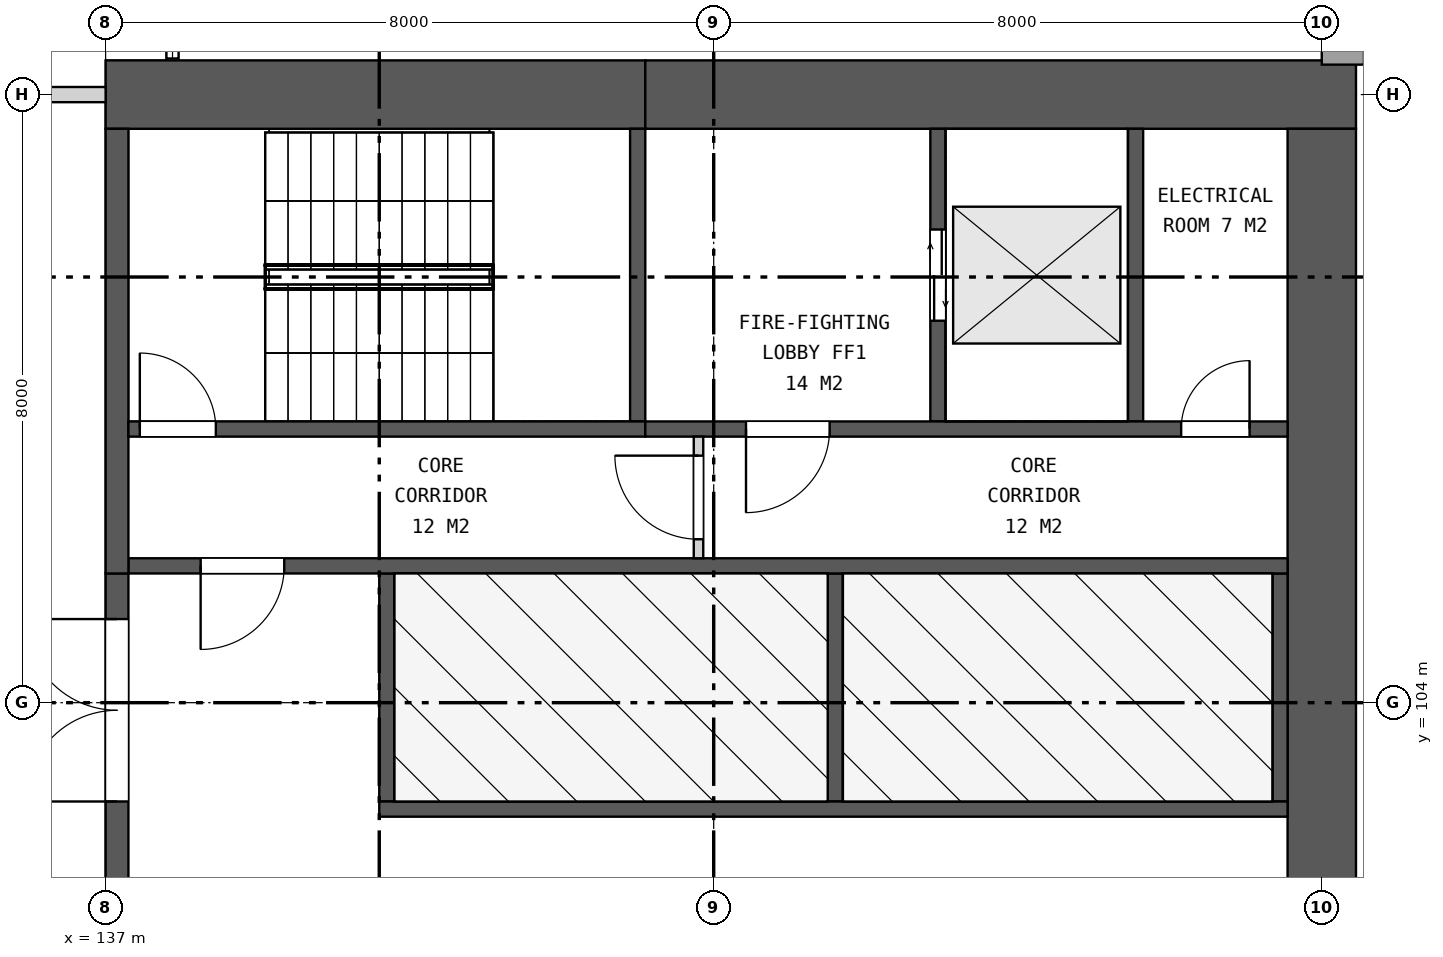
"""IFC4 building model, lengths in metres.
Left out: names, types, materials, properties, quantities, classifications, styles, units other than length and angle.
Written with IfcOpenShell. Run it as: python <this file> out.ifc"""

import sys

from ifc_helpers import new_model, si_unit, direction, frame, frame_2d, origin, place, context, subcontext, project, spatial, rectangle, extrude, element, fill, save


model = new_model("IFC4")
c1 = context("Model", 3, precision=1e-05, world=origin(), true_north=direction((0.0, 1.0)))
c2 = subcontext(c1, "Body", "Model", "MODEL_VIEW")
j1 = project(units=[si_unit("LENGTHUNIT", "METRE"), si_unit("PLANEANGLEUNIT", "RADIAN")], contexts=[c1])
p1 = place(None, origin())
s1 = spatial("IfcSite", under=j1, at=p1, CompositionType="ELEMENT")
p2 = place(p1, origin())
s2 = spatial("IfcBuilding", under=s1, at=p2, CompositionType="ELEMENT")
p3 = place(p2, frame((0.0, 0.0, 17.5)))
s3 = spatial("IfcBuildingStorey", under=s2, at=p3, CompositionType="ELEMENT", Elevation=17.5)
p4 = place(p3, frame((137.0, 112.0, 0.0), z_axis=(0.0, 0.0, 1.0), x_axis=(1.0, 0.0, 0.0)))
e1 = element("IfcWall", 1, at=p4, inside=s3, PredefinedType="SHEAR", context=c2, shape_type="SweptSolid", body=[
    extrude(rectangle(XDim=7.1, YDim=0.9, at=frame_2d((3.55, 0.0))), origin(), (0.0, 0.0, 1.0), 7.5),
])
p5 = place(p3, frame((144.1, 112.0, 0.0), z_axis=(0.0, 0.0, 1.0), x_axis=(1.0, 0.0, 0.0)))
e2 = element("IfcWall", 2, at=p5, inside=s3, PredefinedType="SHEAR", context=c2, shape_type="SweptSolid", body=[
    extrude(rectangle(XDim=9.35, YDim=0.9, at=frame_2d((4.675, 0.0))), origin(), (0.0, 0.0, 1.0), 7.5),
])
p6 = place(p3, frame((153.0, 88.45, 0.0), z_axis=(0.0, 0.0, 1.0), x_axis=(0.0, 1.0, 0.0)))
e3 = element("IfcWall", 3, at=p6, inside=s3, PredefinedType="SHEAR", context=c2, shape_type="SweptSolid", body=[
    extrude(rectangle(XDim=23.1, YDim=0.9, at=frame_2d((11.55, 0.0))), origin(), (0.0, 0.0, 1.0), 7.5),
])
p7 = place(p6, frame((10.35, 0.0, 0.0)))
e4 = element("IfcOpeningElement", 4, at=p7, cuts=e3, PredefinedType="OPENING", context=c2, shape_type="SweptSolid", body=[
    extrude(rectangle(XDim=2.4, YDim=2.4, at=frame_2d((1.2, 1.2))), frame((0.0, 0.46, 0.0), z_axis=(0.0, -1.0, 0.0), x_axis=(1.0, 0.0, 0.0)), (0.0, 0.0, 1.0), 0.92),
])
p8 = place(p3, frame((137.15, 94.3, 0.0), z_axis=(0.0, 0.0, 1.0), x_axis=(0.0, 1.0, 0.0)))
e5 = element("IfcWall", 5, at=p8, inside=s3, PredefinedType="SHEAR", context=c2, shape_type="SweptSolid", body=[
    extrude(rectangle(XDim=11.4, YDim=0.3, at=frame_2d((5.7, 0.0))), origin(), (0.0, 0.0, 1.0), 7.5),
])
p9 = place(p8, frame((0.6, 0.0, 0.0)))
e6 = element("IfcOpeningElement", 6, at=p9, cuts=e5, PredefinedType="OPENING", context=c2, shape_type="SweptSolid", body=[
    extrude(rectangle(XDim=2.4, YDim=2.4, at=frame_2d((1.2, 1.2))), frame((0.0, 0.16, 0.0), z_axis=(0.0, -1.0, 0.0), x_axis=(1.0, 0.0, 0.0)), (0.0, 0.0, 1.0), 0.32),
])
p10 = place(p8, frame((4.5, 0.0, 0.0)))
e7 = element("IfcOpeningElement", 7, at=p10, cuts=e5, PredefinedType="OPENING", context=c2, shape_type="SweptSolid", body=[
    extrude(rectangle(XDim=2.4, YDim=2.4, at=frame_2d((1.2, 1.2))), frame((0.0, 0.16, 0.0), z_axis=(0.0, -1.0, 0.0), x_axis=(1.0, 0.0, 0.0)), (0.0, 0.0, 1.0), 0.32),
])
p11 = place(p8, frame((8.4, 0.0, 0.0)))
e8 = element("IfcOpeningElement", 8, at=p11, cuts=e5, PredefinedType="OPENING", context=c2, shape_type="SweptSolid", body=[
    extrude(rectangle(XDim=2.4, YDim=2.4, at=frame_2d((1.2, 1.2))), frame((0.0, 0.16, 0.0), z_axis=(0.0, -1.0, 0.0), x_axis=(1.0, 0.0, 0.0)), (0.0, 0.0, 1.0), 0.32),
])
for number, where, z_axis, x_axis in (
    (9, (140.7, 102.7, 0.0), (0.0, 0.0, 1.0), (0.0, 1.0, 0.0)),
    (10, (146.6, 102.7, 0.0), (0.0, 0.0, 1.0), (0.0, 1.0, 0.0)),
    (11, (152.45, 102.7, 0.0), (0.0, 0.0, 1.0), (0.0, 1.0, 0.0)),
):
    element("IfcWall", number, at=place(p3, frame(where, z_axis=z_axis, x_axis=x_axis)), inside=s3, PredefinedType="SHEAR", context=c2, shape_type="SweptSolid", body=[
        extrude(rectangle(XDim=3.0, YDim=0.2, at=frame_2d((1.5, 0.0))), origin(), (0.0, 0.0, 1.0), 7.5),
    ])
p12 = place(p3, frame((140.6, 102.6, 0.0), z_axis=(0.0, 0.0, 1.0), x_axis=(1.0, 0.0, 0.0)))
e12 = element("IfcWall", 12, at=p12, inside=s3, PredefinedType="SHEAR", context=c2, shape_type="SweptSolid", body=[
    extrude(rectangle(XDim=11.95, YDim=0.2, at=frame_2d((5.975, 0.0))), origin(), (0.0, 0.0, 1.0), 7.5),
])
p13 = place(p3, frame((137.3, 105.8, 0.0), z_axis=(0.0, 0.0, 1.0), x_axis=(1.0, 0.0, 0.0)))
e13 = element("IfcWall", 13, at=p13, inside=s3, PredefinedType="SHEAR", context=c2, shape_type="SweptSolid", body=[
    extrude(rectangle(XDim=15.25, YDim=0.2, at=frame_2d((7.625, 0.0))), origin(), (0.0, 0.0, 1.0), 7.5),
])
p14 = place(p13, frame((0.95, 0.0, 0.0)))
e14 = element("IfcOpeningElement", 14, at=p14, cuts=e13, PredefinedType="OPENING", context=c2, shape_type="SweptSolid", body=[
    extrude(rectangle(XDim=1.1, YDim=2.1, at=frame_2d((0.55, 1.05))), frame((0.0, 0.11, 0.0), z_axis=(0.0, -1.0, 0.0), x_axis=(1.0, 0.0, 0.0)), (0.0, 0.0, 1.0), 0.22),
])
p15 = place(p3, frame((137.15, 105.7, 0.0), z_axis=(0.0, 0.0, 1.0), x_axis=(0.0, 1.0, 0.0)))
e15 = element("IfcWall", 15, at=p15, inside=s3, PredefinedType="SHEAR", context=c2, shape_type="SweptSolid", body=[
    extrude(rectangle(XDim=5.85, YDim=0.3, at=frame_2d((2.925, 0.0))), origin(), (0.0, 0.0, 1.0), 7.5),
])
p16 = place(p3, frame((144.0, 107.7, 0.0), z_axis=(0.0, 0.0, 1.0), x_axis=(0.0, 1.0, 0.0)))
e16 = element("IfcWall", 16, at=p16, inside=s3, PredefinedType="SHEAR", context=c2, shape_type="SweptSolid", body=[
    extrude(rectangle(XDim=3.85, YDim=0.2, at=frame_2d((1.925, 0.0))), origin(), (0.0, 0.0, 1.0), 7.5),
])
p17 = place(p3, frame((147.95, 107.7, 0.0), z_axis=(0.0, 0.0, 1.0), x_axis=(0.0, 1.0, 0.0)))
e17 = element("IfcWall", 17, at=p17, inside=s3, PredefinedType="SHEAR", context=c2, shape_type="SweptSolid", body=[
    extrude(rectangle(XDim=3.85, YDim=0.2, at=frame_2d((1.925, 0.0))), origin(), (0.0, 0.0, 1.0), 7.5),
])
p18 = place(p17, frame((1.325, 0.0, 0.0)))
e18 = element("IfcOpeningElement", 18, at=p18, cuts=e17, PredefinedType="OPENING", context=c2, shape_type="SweptSolid", body=[
    extrude(rectangle(XDim=1.2, YDim=2.1, at=frame_2d((0.6, 1.05))), frame((0.0, 0.11, 0.0), z_axis=(0.0, -1.0, 0.0), x_axis=(1.0, 0.0, 0.0)), (0.0, 0.0, 1.0), 0.22),
])
p19 = place(p3, frame((150.55, 107.7, 0.0), z_axis=(0.0, 0.0, 1.0), x_axis=(0.0, 1.0, 0.0)))
e19 = element("IfcWall", 19, at=p19, inside=s3, PredefinedType="SHEAR", context=c2, shape_type="SweptSolid", body=[
    extrude(rectangle(XDim=3.85, YDim=0.2, at=frame_2d((1.925, 0.0))), origin(), (0.0, 0.0, 1.0), 7.5),
])
p20 = place(p3, frame((137.3, 107.6, 0.0), z_axis=(0.0, 0.0, 1.0), x_axis=(1.0, 0.0, 0.0)))
e20 = element("IfcWall", 20, at=p20, inside=s3, PredefinedType="SHEAR", context=c2, shape_type="SweptSolid", body=[
    extrude(rectangle(XDim=6.8, YDim=0.2, at=frame_2d((3.4, 0.0))), origin(), (0.0, 0.0, 1.0), 7.5),
])
p21 = place(p20, frame((0.15, 0.0, 0.0)))
e21 = element("IfcOpeningElement", 21, at=p21, cuts=e20, PredefinedType="OPENING", context=c2, shape_type="SweptSolid", body=[
    extrude(rectangle(XDim=1.0, YDim=2.1, at=frame_2d((0.5, 1.05))), frame((0.0, 0.11, 0.0), z_axis=(0.0, -1.0, 0.0), x_axis=(1.0, 0.0, 0.0)), (0.0, 0.0, 1.0), 0.22),
])
p22 = place(p3, frame((144.1, 107.6, 0.0), z_axis=(0.0, 0.0, 1.0), x_axis=(1.0, 0.0, 0.0)))
e22 = element("IfcWall", 22, at=p22, inside=s3, PredefinedType="SHEAR", context=c2, shape_type="SweptSolid", body=[
    extrude(rectangle(XDim=8.45, YDim=0.2, at=frame_2d((4.225, 0.0))), origin(), (0.0, 0.0, 1.0), 7.5),
])
p23 = place(p22, frame((1.325, 0.0, 0.0)))
e23 = element("IfcOpeningElement", 23, at=p23, cuts=e22, PredefinedType="OPENING", context=c2, shape_type="SweptSolid", body=[
    extrude(rectangle(XDim=1.1, YDim=2.1, at=frame_2d((0.55, 1.05))), frame((0.0, 0.11, 0.0), z_axis=(0.0, -1.0, 0.0), x_axis=(1.0, 0.0, 0.0)), (0.0, 0.0, 1.0), 0.22),
])
p24 = place(p22, frame((7.05, 0.0, 0.0)))
e24 = element("IfcOpeningElement", 24, at=p24, cuts=e22, PredefinedType="OPENING", context=c2, shape_type="SweptSolid", body=[
    extrude(rectangle(XDim=0.9, YDim=2.1, at=frame_2d((0.45, 1.05))), frame((0.0, 0.11, 0.0), z_axis=(0.0, -1.0, 0.0), x_axis=(1.0, 0.0, 0.0)), (0.0, 0.0, 1.0), 0.22),
])
p25 = place(p3, frame((144.8, 105.9, 0.0), z_axis=(0.0, 0.0, 1.0), x_axis=(0.0, 1.0, 0.0)))
e25 = element("IfcWall", 25, at=p25, inside=s3, PredefinedType="PARTITIONING", context=c2, shape_type="SweptSolid", body=[
    extrude(rectangle(XDim=1.6, YDim=0.125, at=frame_2d((0.8, 0.0))), origin(), (0.0, 0.0, 1.0), 7.5),
])
p26 = place(p25, frame((0.25, 0.0, 0.0)))
e26 = element("IfcOpeningElement", 26, at=p26, cuts=e25, PredefinedType="OPENING", context=c2, shape_type="SweptSolid", body=[
    extrude(rectangle(XDim=1.1, YDim=2.1, at=frame_2d((0.55, 1.05))), frame((0.0, 0.073, 0.0), z_axis=(0.0, -1.0, 0.0), x_axis=(1.0, 0.0, 0.0)), (0.0, 0.0, 1.0), 0.145),
])
p27 = place(p3, frame((153.0, 112.597, 0.0), z_axis=(0.0, 0.0, 1.0), x_axis=(1.0, 0.0, 0.0)))
e27 = element("IfcWall", 27, at=p27, inside=s3, PredefinedType="SOLIDWALL", context=c2, shape_type="SweptSolid", body=[
    extrude(rectangle(XDim=0.555, YDim=0.406, at=frame_2d((0.277, 0.0))), origin(), (0.0, 0.0, 1.0), 7.1),
])
p28 = place(p3, frame((129.6, 112.0, 0.0), z_axis=(0.0, 0.0, 1.0), x_axis=(1.0, 0.0, 0.0)))
e28 = element("IfcWall", 28, at=p28, inside=s3, PredefinedType="PARTITIONING", context=c2, shape_type="SweptSolid", body=[
    extrude(rectangle(XDim=7.4, YDim=0.2, at=frame_2d((3.7, 0.0))), origin(), (0.0, 0.0, 1.0), 6.551),
])
p29 = place(p28, frame((2.2, 0.0, 0.0)))
e29 = element("IfcOpeningElement", 29, at=p29, cuts=e28, PredefinedType="OPENING", context=c2, shape_type="SweptSolid", body=[
    extrude(rectangle(XDim=2.4, YDim=2.4, at=frame_2d((1.2, 1.2))), frame((0.0, 0.11, 0.0), z_axis=(0.0, -1.0, 0.0), x_axis=(1.0, 0.0, 0.0)), (0.0, 0.0, 1.0), 0.22),
])
p30 = place(p11, origin())
e30 = element("IfcDoor", 30, at=p30, inside=s3, OperationType="DOUBLE_DOOR_SINGLE_SWING", PredefinedType="DOOR", context=c2, shape_type="SweptSolid", body=[
    extrude(rectangle(XDim=2.4, YDim=2.4, at=frame_2d((1.2, 1.2))), frame((0.0, 0.025, 0.0), z_axis=(0.0, -1.0, 0.0), x_axis=(1.0, 0.0, 0.0)), (0.0, 0.0, 1.0), 0.05),
])
fill(e8, e30)
p31 = place(p14, frame((1.1, 0.0, 0.0), z_axis=(0.0, 0.0, 1.0), x_axis=(-1.0, 0.0, 0.0)))
e31 = element("IfcDoor", 31, at=p31, inside=s3, OperationType="SINGLE_SWING_RIGHT", PredefinedType="DOOR", context=c2, shape_type="SweptSolid", body=[
    extrude(rectangle(XDim=1.1, YDim=2.1, at=frame_2d((0.55, 1.05))), frame((0.0, 0.025, 0.0), z_axis=(0.0, -1.0, 0.0), x_axis=(1.0, 0.0, 0.0)), (0.0, 0.0, 1.0), 0.05),
])
fill(e14, e31)
p32 = place(p18, origin())
e32 = element("IfcDoor", 32, at=p32, inside=s3, OperationType="DOUBLE_DOOR_SLIDING", PredefinedType="DOOR", context=c2, shape_type="SweptSolid", body=[
    extrude(rectangle(XDim=1.2, YDim=2.1, at=frame_2d((0.6, 1.05))), frame((0.0, 0.025, 0.0), z_axis=(0.0, -1.0, 0.0), x_axis=(1.0, 0.0, 0.0)), (0.0, 0.0, 1.0), 0.05),
])
fill(e18, e32)
p33 = place(p21, origin())
e33 = element("IfcDoor", 33, at=p33, inside=s3, OperationType="SINGLE_SWING_LEFT", PredefinedType="DOOR", context=c2, shape_type="SweptSolid", body=[
    extrude(rectangle(XDim=1.0, YDim=2.1, at=frame_2d((0.5, 1.05))), frame((0.0, 0.025, 0.0), z_axis=(0.0, -1.0, 0.0), x_axis=(1.0, 0.0, 0.0)), (0.0, 0.0, 1.0), 0.05),
])
fill(e21, e33)
p34 = place(p23, frame((1.1, 0.0, 0.0), z_axis=(0.0, 0.0, 1.0), x_axis=(-1.0, 0.0, 0.0)))
e34 = element("IfcDoor", 34, at=p34, inside=s3, OperationType="SINGLE_SWING_RIGHT", PredefinedType="DOOR", context=c2, shape_type="SweptSolid", body=[
    extrude(rectangle(XDim=1.1, YDim=2.1, at=frame_2d((0.55, 1.05))), frame((0.0, 0.025, 0.0), z_axis=(0.0, -1.0, 0.0), x_axis=(1.0, 0.0, 0.0)), (0.0, 0.0, 1.0), 0.05),
])
fill(e23, e34)
p35 = place(p24, origin())
e35 = element("IfcDoor", 35, at=p35, inside=s3, OperationType="SINGLE_SWING_RIGHT", PredefinedType="DOOR", context=c2, shape_type="SweptSolid", body=[
    extrude(rectangle(XDim=0.9, YDim=2.1, at=frame_2d((0.45, 1.05))), frame((0.0, 0.025, 0.0), z_axis=(0.0, -1.0, 0.0), x_axis=(1.0, 0.0, 0.0)), (0.0, 0.0, 1.0), 0.05),
])
fill(e24, e35)
p36 = place(p26, origin())
e36 = element("IfcDoor", 36, at=p36, inside=s3, OperationType="SINGLE_SWING_RIGHT", PredefinedType="DOOR", context=c2, shape_type="SweptSolid", body=[
    extrude(rectangle(XDim=1.1, YDim=2.1, at=frame_2d((0.55, 1.05))), frame((0.0, 0.025, 0.0), z_axis=(0.0, -1.0, 0.0), x_axis=(1.0, 0.0, 0.0)), (0.0, 0.0, 1.0), 0.05),
])
fill(e26, e36)
save(model, sys.argv[1])
